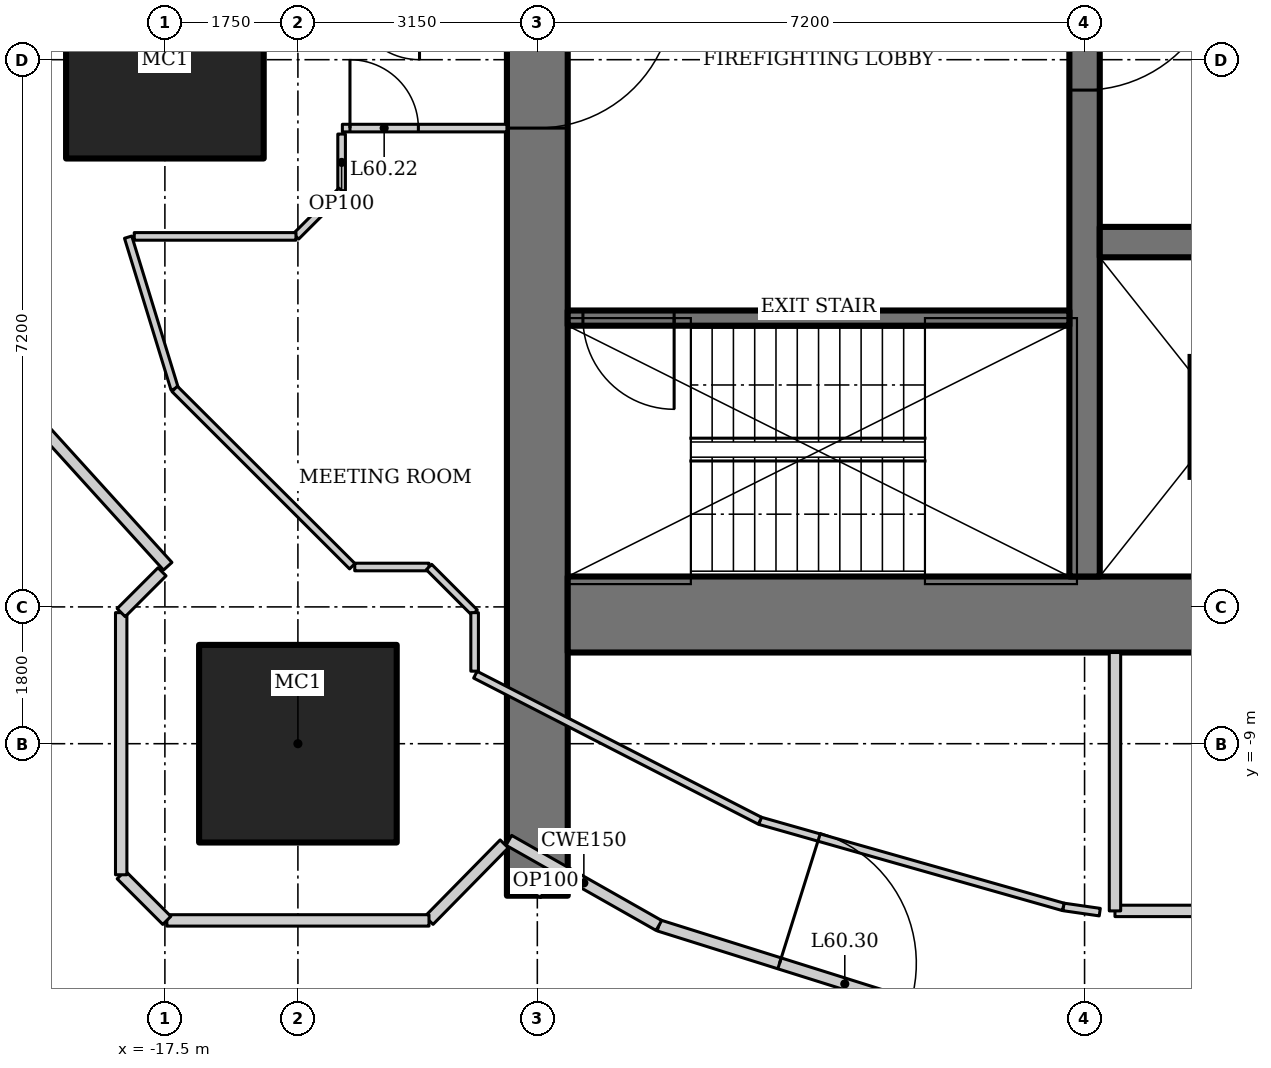
"""IFC4 building model, lengths in metres.
Left out: names, types, materials, properties, quantities, classifications, styles, units other than length and angle.
Written with IfcOpenShell. Run it as: python <this file> out.ifc"""

import sys

from ifc_helpers import new_model, si_unit, direction, frame, frame_2d, origin, origin_2d, place, context, subcontext, project, spatial, rectangle, hollow_rectangle, extrude, element, fill, save


model = new_model("IFC4")
c1 = context("Model", 3, precision=1e-05, world=origin(), true_north=direction((0.0, 1.0)))
c2 = subcontext(c1, "Body", "Model", "MODEL_VIEW")
j1 = project(units=[si_unit("LENGTHUNIT", "METRE"), si_unit("PLANEANGLEUNIT", "RADIAN")], contexts=[c1])
p1 = place(None, origin())
s1 = spatial("IfcSite", under=j1, at=p1, CompositionType="ELEMENT")
p2 = place(p1, origin())
s2 = spatial("IfcBuilding", under=s1, at=p2, CompositionType="ELEMENT")
p3 = place(p2, frame((0.0, 0.0, 257.8)))
s3 = spatial("IfcBuildingStorey", under=s2, at=p3, CompositionType="ELEMENT", Elevation=257.8)
for number, where, z_axis, x_axis in (
    (1, (-17.5, 0.0, 0.0), (0.0, 0.0, 1.0), (1.0, 0.0, 0.0)),
    (2, (-15.75, -9.0, 0.0), (0.0, 0.0, 1.0), (1.0, 0.0, 0.0)),
):
    element("IfcColumn", number, at=place(p3, frame(where, z_axis=z_axis, x_axis=x_axis)), inside=s3, PredefinedType="COLUMN", context=c2, shape_type="SweptSolid", body=[
        extrude(hollow_rectangle(XDim=2.6, YDim=2.6, WallThickness=0.13, at=origin_2d()), origin(), (0.0, 0.0, 1.0), 4.2),
    ])
p4 = place(p3, frame((-12.6, 11.0, 0.0), z_axis=(0.0, 0.0, 1.0), x_axis=(0.0, -1.0, 0.0)))
e3 = element("IfcWall", 3, at=p4, inside=s3, PredefinedType="SHEAR", context=c2, shape_type="SweptSolid", body=[
    extrude(rectangle(XDim=22.0, YDim=0.8, at=frame_2d((11.0, 0.0))), origin(), (0.0, 0.0, 1.0), 4.2),
])
p5 = place(p4, frame((10.1, 0.0, 0.0)))
e4 = element("IfcOpeningElement", 4, at=p5, cuts=e3, PredefinedType="OPENING", context=c2, shape_type="SweptSolid", body=[
    extrude(rectangle(XDim=1.8, YDim=2.1, at=frame_2d((0.9, 1.05))), frame((0.0, 0.41, 0.0), z_axis=(0.0, -1.0, 0.0), x_axis=(1.0, 0.0, 0.0)), (0.0, 0.0, 1.0), 0.82),
])
p6 = place(p3, frame((-12.2, -7.3, 0.0), z_axis=(0.0, 0.0, 1.0), x_axis=(1.0, 0.0, 0.0)))
e5 = element("IfcWall", 5, at=p6, inside=s3, PredefinedType="SHEAR", context=c2, shape_type="SweptSolid", body=[
    extrude(rectangle(XDim=24.4, YDim=1.0, at=frame_2d((12.2, 0.0))), origin(), (0.0, 0.0, 1.0), 4.2),
])
p7 = place(p3, frame((-5.4, 7.8, 0.0), z_axis=(0.0, 0.0, 1.0), x_axis=(0.0, -1.0, 0.0)))
e6 = element("IfcWall", 6, at=p7, inside=s3, PredefinedType="SHEAR", context=c2, shape_type="SweptSolid", body=[
    extrude(rectangle(XDim=14.6, YDim=0.4, at=frame_2d((7.3, 0.0))), origin(), (0.0, 0.0, 1.0), 4.2),
])
p8 = place(p7, frame((6.4, 0.0, 0.0)))
e7 = element("IfcOpeningElement", 7, at=p8, cuts=e6, PredefinedType="OPENING", context=c2, shape_type="SweptSolid", body=[
    extrude(rectangle(XDim=1.8, YDim=2.1, at=frame_2d((0.9, 1.05))), frame((0.0, 0.21, 0.0), z_axis=(0.0, -1.0, 0.0), x_axis=(1.0, 0.0, 0.0)), (0.0, 0.0, 1.0), 0.42),
])
p9 = place(p3, frame((-5.2, -2.4, 0.0), z_axis=(0.0, 0.0, 1.0), x_axis=(1.0, 0.0, 0.0)))
e8 = element("IfcWall", 8, at=p9, inside=s3, PredefinedType="SHEAR", context=c2, shape_type="SweptSolid", body=[
    extrude(rectangle(XDim=10.4, YDim=0.4, at=frame_2d((5.2, 0.0))), origin(), (0.0, 0.0, 1.0), 4.2),
])
p10 = place(p9, frame((1.683, 0.0, 0.0)))
e9 = element("IfcOpeningElement", 9, at=p10, cuts=e8, PredefinedType="OPENING", context=c2, shape_type="SweptSolid", body=[
    extrude(rectangle(XDim=1.1, YDim=2.2, at=frame_2d((0.55, 1.1))), frame((0.0, 0.21, 0.0), z_axis=(0.0, -1.0, 0.0), x_axis=(1.0, 0.0, 0.0)), (0.0, 0.0, 1.0), 0.42),
])
p11 = place(p9, frame((5.217, 0.0, 0.0)))
e10 = element("IfcOpeningElement", 10, at=p11, cuts=e8, PredefinedType="OPENING", context=c2, shape_type="SweptSolid", body=[
    extrude(rectangle(XDim=1.1, YDim=2.2, at=frame_2d((0.55, 1.1))), frame((0.0, 0.21, 0.0), z_axis=(0.0, -1.0, 0.0), x_axis=(1.0, 0.0, 0.0)), (0.0, 0.0, 1.0), 0.42),
])
p12 = place(p9, frame((8.75, 0.0, 0.0)))
e11 = element("IfcOpeningElement", 11, at=p12, cuts=e8, PredefinedType="OPENING", context=c2, shape_type="SweptSolid", body=[
    extrude(rectangle(XDim=1.1, YDim=2.2, at=frame_2d((0.55, 1.1))), frame((0.0, 0.21, 0.0), z_axis=(0.0, -1.0, 0.0), x_axis=(1.0, 0.0, 0.0)), (0.0, 0.0, 1.0), 0.42),
])
p13 = place(p3, frame((-5.6, -3.4, 0.0), z_axis=(0.0, 0.0, 1.0), x_axis=(-1.0, 0.0, 0.0)))
e12 = element("IfcWall", 12, at=p13, inside=s3, PredefinedType="SHEAR", context=c2, shape_type="SweptSolid", body=[
    extrude(rectangle(XDim=6.6, YDim=0.2, at=frame_2d((3.3, 0.0))), origin(), (0.0, 0.0, 1.0), 4.2),
])
p14 = place(p13, frame((5.2, 0.0, 0.0)))
e13 = element("IfcOpeningElement", 13, at=p14, cuts=e12, PredefinedType="OPENING", context=c2, shape_type="SweptSolid", body=[
    extrude(rectangle(XDim=1.2, YDim=2.1, at=frame_2d((0.6, 1.05))), frame((0.0, 0.11, 0.0), z_axis=(0.0, -1.0, 0.0), x_axis=(1.0, 0.0, 0.0)), (0.0, 0.0, 1.0), 0.22),
])
p15 = place(p3, frame((-11.001, -11.392, 0.0), z_axis=(0.0, 0.0, 1.0), x_axis=(0.954031103669, -0.299707612903, 0.0)))
e14 = element("IfcWall", 14, at=p15, inside=s3, PredefinedType="PARTITIONING", context=c2, shape_type="SweptSolid", body=[
    extrude(rectangle(XDim=4.695, YDim=0.15, at=frame_2d((2.348, 0.0))), origin(), (0.0, 0.0, 1.0), 4.05),
])
p16 = place(p15, frame((1.664, 0.0, 0.0)))
e15 = element("IfcOpeningElement", 15, at=p16, cuts=e14, PredefinedType="OPENING", context=c2, shape_type="SweptSolid", body=[
    extrude(rectangle(XDim=1.8, YDim=2.1, at=frame_2d((0.9, 1.05))), frame((0.0, 0.085, 0.0), z_axis=(0.0, -1.0, 0.0), x_axis=(1.0, 0.0, 0.0)), (0.0, 0.0, 1.0), 0.17),
])
p17 = place(p3, frame((-5.0, -11.2, 0.0), z_axis=(0.0, 0.0, 1.0), x_axis=(1.0, 0.0, 0.0)))
e16 = element("IfcWall", 16, at=p17, inside=s3, PredefinedType="SOLIDWALL", context=c2, shape_type="SweptSolid", body=[
    extrude(rectangle(XDim=10.0, YDim=0.15, at=frame_2d((5.0, 0.0))), origin(), (0.0, 0.0, 1.0), 4.05),
])
p18 = place(p17, frame((1.25, 0.0, 0.0)))
e17 = element("IfcOpeningElement", 17, at=p18, cuts=e16, PredefinedType="OPENING", context=c2, shape_type="SweptSolid", body=[
    extrude(rectangle(XDim=0.9, YDim=2.1, at=frame_2d((0.45, 1.05))), frame((0.0, 0.085, 0.0), z_axis=(0.0, -1.0, 0.0), x_axis=(1.0, 0.0, 0.0)), (0.0, 0.0, 1.0), 0.17),
])
p19 = place(p17, frame((4.65, 0.0, 0.0)))
e18 = element("IfcOpeningElement", 18, at=p19, cuts=e16, PredefinedType="OPENING", context=c2, shape_type="SweptSolid", body=[
    extrude(rectangle(XDim=0.9, YDim=2.1, at=frame_2d((0.45, 1.05))), frame((0.0, 0.085, 0.0), z_axis=(0.0, -1.0, 0.0), x_axis=(1.0, 0.0, 0.0)), (0.0, 0.0, 1.0), 0.17),
])
p20 = place(p17, frame((7.25, 0.0, 0.0)))
e19 = element("IfcOpeningElement", 19, at=p20, cuts=e16, PredefinedType="OPENING", context=c2, shape_type="SweptSolid", body=[
    extrude(rectangle(XDim=1.0, YDim=2.1, at=frame_2d((0.5, 1.05))), frame((0.0, 0.085, 0.0), z_axis=(0.0, -1.0, 0.0), x_axis=(1.0, 0.0, 0.0)), (0.0, 0.0, 1.0), 0.17),
])
p21 = place(p17, frame((8.95, 0.0, 0.0)))
e20 = element("IfcOpeningElement", 20, at=p21, cuts=e16, PredefinedType="OPENING", context=c2, shape_type="SweptSolid", body=[
    extrude(rectangle(XDim=0.8, YDim=2.1, at=frame_2d((0.4, 1.05))), frame((0.0, 0.085, 0.0), z_axis=(0.0, -1.0, 0.0), x_axis=(1.0, 0.0, 0.0)), (0.0, 0.0, 1.0), 0.17),
])
p22 = place(p3, frame((-5.0, -7.8, 0.0), z_axis=(0.0, 0.0, 1.0), x_axis=(0.0, -1.0, 0.0)))
e21 = element("IfcWall", 21, at=p22, inside=s3, PredefinedType="SOLIDWALL", context=c2, shape_type="SweptSolid", body=[
    extrude(rectangle(XDim=3.4, YDim=0.15, at=frame_2d((1.7, 0.0))), origin(), (0.0, 0.0, 1.0), 4.05),
])
p23 = place(p3, frame((-5.2, -11.216, 0.0), z_axis=(0.0, 0.0, 1.0), x_axis=(-0.989797891768, 0.142478536811, 0.0)))
e22 = element("IfcWall", 22, at=p23, inside=s3, PredefinedType="PARTITIONING", context=c2, shape_type="SweptSolid", body=[
    extrude(rectangle(XDim=0.485, YDim=0.1, at=frame_2d((0.242, 0.0))), origin(), (0.0, 0.0, 1.0), 4.05),
])
p24 = place(p3, frame((-5.68, -11.147, 0.0), z_axis=(0.0, 0.0, 1.0), x_axis=(-0.961973498971, 0.273142796496, 0.0)))
e23 = element("IfcWall", 23, at=p24, inside=s3, PredefinedType="PARTITIONING", context=c2, shape_type="SweptSolid", body=[
    extrude(rectangle(XDim=4.148, YDim=0.1, at=frame_2d((2.074, 0.0))), origin(), (0.0, 0.0, 1.0), 4.05),
])
p25 = place(p3, frame((-12.6, -11.0, 0.0), z_axis=(0.0, 0.0, 1.0), x_axis=(0.493794495037, 0.869578631678, 0.0)))
e24 = element("IfcWall", 24, at=p25, inside=s3, PredefinedType="PARTITIONING", context=c2, shape_type="SweptSolid", body=[
    extrude(rectangle(XDim=0.449, YDim=0.1, at=frame_2d((0.225, 0.0))), origin(), (0.0, 0.0, 1.0), 4.05),
])
p26 = place(p3, frame((-17.372, -4.331, 0.0), z_axis=(0.0, 0.0, 1.0), x_axis=(-0.293231279211, 0.956041535129, 0.0)))
e25 = element("IfcWall", 25, at=p26, inside=s3, PredefinedType="PARTITIONING", context=c2, shape_type="SweptSolid", body=[
    extrude(rectangle(XDim=2.088, YDim=0.1, at=frame_2d((1.044, 0.0))), origin(), (0.0, 0.0, 1.0), 4.05),
])
p27 = place(p3, frame((-15.165, -0.9, 0.0), z_axis=(0.0, 0.0, 1.0), x_axis=(1.0, 0.0, 0.0)))
e26 = element("IfcWall", 26, at=p27, inside=s3, PredefinedType="PARTITIONING", context=c2, shape_type="SweptSolid", body=[
    extrude(rectangle(XDim=2.165, YDim=0.1, at=frame_2d((1.083, 0.0))), origin(), (0.0, 0.0, 1.0), 4.05),
])
p28 = place(p27, frame((0.1, 0.0, 0.0)))
e27 = element("IfcOpeningElement", 27, at=p28, cuts=e26, PredefinedType="OPENING", context=c2, shape_type="SweptSolid", body=[
    extrude(rectangle(XDim=0.9, YDim=2.1, at=frame_2d((0.45, 1.05))), frame((0.0, 0.06, 0.0), z_axis=(0.0, -1.0, 0.0), x_axis=(1.0, 0.0, 0.0)), (0.0, 0.0, 1.0), 0.12),
])
p29 = place(p3, frame((-15.175, -0.978, 0.0), z_axis=(0.0, 0.0, 1.0), x_axis=(0.0, -1.0, 0.0)))
e28 = element("IfcWall", 28, at=p29, inside=s3, PredefinedType="PARTITIONING", context=c2, shape_type="SweptSolid", body=[
    extrude(rectangle(XDim=0.746, YDim=0.1, at=frame_2d((0.373, 0.0))), origin(), (0.0, 0.0, 1.0), 4.05),
])
p30 = place(p3, frame((-15.175, -1.725, 0.0), z_axis=(0.0, 0.0, 1.0), x_axis=(-0.707106781187, -0.707106781187, 0.0)))
e29 = element("IfcWall", 29, at=p30, inside=s3, PredefinedType="PARTITIONING", context=c2, shape_type="SweptSolid", body=[
    extrude(rectangle(XDim=0.849, YDim=0.1, at=frame_2d((0.425, 0.0))), origin(), (0.0, 0.0, 1.0), 4.05),
])
p31 = place(p3, frame((-15.775, -2.325, 0.0), z_axis=(0.0, 0.0, 1.0), x_axis=(-1.0, 0.0, 0.0)))
e30 = element("IfcWall", 30, at=p31, inside=s3, PredefinedType="PARTITIONING", context=c2, shape_type="SweptSolid", body=[
    extrude(rectangle(XDim=2.128, YDim=0.1, at=frame_2d((1.064, 0.0))), origin(), (0.0, 0.0, 1.0), 4.05),
])
p32 = place(p3, frame((-19.172, -4.78, 0.0), z_axis=(0.0, 0.0, 1.0), x_axis=(0.671721890643, -0.74080341632, 0.0)))
e31 = element("IfcWall", 31, at=p32, inside=s3, PredefinedType="PARTITIONING", context=c2, shape_type="SweptSolid", body=[
    extrude(rectangle(XDim=2.544, YDim=0.15, at=frame_2d((1.272, 0.0))), origin(), (0.0, 0.0, 1.0), 4.05),
])
p33 = place(p3, frame((-12.975, -10.271, 0.0), z_axis=(0.0, 0.0, 1.0), x_axis=(0.869722107117, -0.493541747366, 0.0)))
e32 = element("IfcWall", 32, at=p33, inside=s3, PredefinedType="PARTITIONING", context=c2, shape_type="SweptSolid", body=[
    extrude(rectangle(XDim=2.27, YDim=0.15, at=frame_2d((1.135, 0.0))), origin(), (0.0, 0.0, 1.0), 4.05),
])
p34 = place(p3, frame((-9.67, -10.014, 0.0), z_axis=(0.0, 0.0, 1.0), x_axis=(-0.889620520549, 0.45670048108, 0.0)))
e33 = element("IfcWall", 33, at=p34, inside=s3, PredefinedType="PARTITIONING", context=c2, shape_type="SweptSolid", body=[
    extrude(rectangle(XDim=4.209, YDim=0.1, at=frame_2d((2.104, 0.0))), origin(), (0.0, 0.0, 1.0), 4.05),
])
p35 = place(p3, frame((-15.035, -6.665, 0.0), z_axis=(0.0, 0.0, 1.0), x_axis=(-0.707587114823, 0.70662612104, 0.0)))
e34 = element("IfcWall", 34, at=p35, inside=s3, PredefinedType="PARTITIONING", context=c2, shape_type="SweptSolid", body=[
    extrude(rectangle(XDim=3.303, YDim=0.1, at=frame_2d((1.651, 0.0))), origin(), (0.0, 0.0, 1.0), 4.05),
])
p36 = place(p3, frame((-15.002, -6.675, 0.0), z_axis=(0.0, 0.0, 1.0), x_axis=(1.0, 0.0, 0.0)))
e35 = element("IfcWall", 35, at=p36, inside=s3, PredefinedType="PARTITIONING", context=c2, shape_type="SweptSolid", body=[
    extrude(rectangle(XDim=0.977, YDim=0.1, at=frame_2d((0.488, 0.0))), origin(), (0.0, 0.0, 1.0), 4.05),
])
p37 = place(p3, frame((-14.025, -6.675, 0.0), z_axis=(0.0, 0.0, 1.0), x_axis=(0.707106781187, -0.707106781187, 0.0)))
e36 = element("IfcWall", 36, at=p37, inside=s3, PredefinedType="PARTITIONING", context=c2, shape_type="SweptSolid", body=[
    extrude(rectangle(XDim=0.849, YDim=0.1, at=frame_2d((0.425, 0.0))), origin(), (0.0, 0.0, 1.0), 4.05),
])
p38 = place(p3, frame((-13.425, -7.275, 0.0), z_axis=(0.0, 0.0, 1.0), x_axis=(0.0, -1.0, 0.0)))
e37 = element("IfcWall", 37, at=p38, inside=s3, PredefinedType="PARTITIONING", context=c2, shape_type="SweptSolid", body=[
    extrude(rectangle(XDim=0.77, YDim=0.1, at=frame_2d((0.385, 0.0))), origin(), (0.0, 0.0, 1.0), 4.05),
])
p39 = place(p3, frame((-13.036, -10.319, 0.0), z_axis=(0.0, 0.0, 1.0), x_axis=(-0.701113567316, -0.713049623606, 0.0)))
e38 = element("IfcWall", 38, at=p39, inside=s3, PredefinedType="PARTITIONING", context=c2, shape_type="SweptSolid", body=[
    extrude(rectangle(XDim=1.411, YDim=0.15, at=frame_2d((0.706, 0.0))), origin(), (0.0, 0.0, 1.0), 4.05),
])
p40 = place(p3, frame((-14.025, -11.325, 0.0), z_axis=(0.0, 0.0, 1.0), x_axis=(-1.0, 0.0, 0.0)))
e39 = element("IfcWall", 39, at=p40, inside=s3, PredefinedType="PARTITIONING", context=c2, shape_type="SweptSolid", body=[
    extrude(rectangle(XDim=3.449, YDim=0.15, at=frame_2d((1.725, 0.0))), origin(), (0.0, 0.0, 1.0), 4.05),
])
p41 = place(p3, frame((-17.475, -11.325, 0.0), z_axis=(0.0, 0.0, 1.0), x_axis=(-0.707106781187, 0.707106781187, 0.0)))
e40 = element("IfcWall", 40, at=p41, inside=s3, PredefinedType="PARTITIONING", context=c2, shape_type="SweptSolid", body=[
    extrude(rectangle(XDim=0.849, YDim=0.15, at=frame_2d((0.425, 0.0))), origin(), (0.0, 0.0, 1.0), 4.05),
])
p42 = place(p3, frame((-18.075, -10.725, 0.0), z_axis=(0.0, 0.0, 1.0), x_axis=(0.0, 1.0, 0.0)))
e41 = element("IfcWall", 41, at=p42, inside=s3, PredefinedType="PARTITIONING", context=c2, shape_type="SweptSolid", body=[
    extrude(rectangle(XDim=3.449, YDim=0.15, at=frame_2d((1.725, 0.0))), origin(), (0.0, 0.0, 1.0), 3.6),
])
p43 = place(p3, frame((-18.075, -7.275, 0.0), z_axis=(0.0, 0.0, 1.0), x_axis=(0.707106781187, 0.707106781187, 0.0)))
e42 = element("IfcWall", 42, at=p43, inside=s3, PredefinedType="PARTITIONING", context=c2, shape_type="SweptSolid", body=[
    extrude(rectangle(XDim=0.76, YDim=0.15, at=frame_2d((0.38, 0.0))), origin(), (0.0, 0.0, 1.0), 4.05),
])
p44 = place(p8, origin())
e43 = element("IfcDoor", 43, at=p44, inside=s3, OperationType="DOUBLE_DOOR_DOUBLE_SWING", PredefinedType="DOOR", context=c2, shape_type="SweptSolid", body=[
    extrude(rectangle(XDim=1.8, YDim=2.1, at=frame_2d((0.9, 1.05))), frame((0.0, 0.025, 0.0), z_axis=(0.0, -1.0, 0.0), x_axis=(1.0, 0.0, 0.0)), (0.0, 0.0, 1.0), 0.05),
])
fill(e7, e43)
p45 = place(p14, origin())
e44 = element("IfcDoor", 44, at=p45, inside=s3, OperationType="SINGLE_SWING_RIGHT", PredefinedType="DOOR", context=c2, shape_type="SweptSolid", body=[
    extrude(rectangle(XDim=1.2, YDim=2.1, at=frame_2d((0.6, 1.05))), frame((0.0, 0.025, 0.0), z_axis=(0.0, -1.0, 0.0), x_axis=(1.0, 0.0, 0.0)), (0.0, 0.0, 1.0), 0.05),
])
fill(e13, e44)
p46 = place(p5, origin())
e45 = element("IfcDoor", 45, at=p46, inside=s3, OperationType="DOUBLE_DOOR_DOUBLE_SWING", PredefinedType="DOOR", context=c2, shape_type="SweptSolid", body=[
    extrude(rectangle(XDim=1.8, YDim=2.1, at=frame_2d((0.9, 1.05))), frame((0.0, 0.025, 0.0), z_axis=(0.0, -1.0, 0.0), x_axis=(1.0, 0.0, 0.0)), (0.0, 0.0, 1.0), 0.05),
])
fill(e4, e45)
p47 = place(p28, origin())
e46 = element("IfcDoor", 46, at=p47, inside=s3, OperationType="SINGLE_SWING_LEFT", PredefinedType="DOOR", context=c2, shape_type="SweptSolid", body=[
    extrude(rectangle(XDim=0.9, YDim=2.1, at=frame_2d((0.45, 1.05))), frame((0.0, 0.025, 0.0), z_axis=(0.0, -1.0, 0.0), x_axis=(1.0, 0.0, 0.0)), (0.0, 0.0, 1.0), 0.05),
])
fill(e27, e46)
p48 = place(p16, origin())
e47 = element("IfcDoor", 47, at=p48, inside=s3, OperationType="DOUBLE_DOOR_DOUBLE_SWING", PredefinedType="DOOR", context=c2, shape_type="SweptSolid", body=[
    extrude(rectangle(XDim=1.8, YDim=2.1, at=frame_2d((0.9, 1.05))), frame((0.0, 0.025, 0.0), z_axis=(0.0, -1.0, 0.0), x_axis=(1.0, 0.0, 0.0)), (0.0, 0.0, 1.0), 0.05),
])
fill(e15, e47)
save(model, sys.argv[1])
